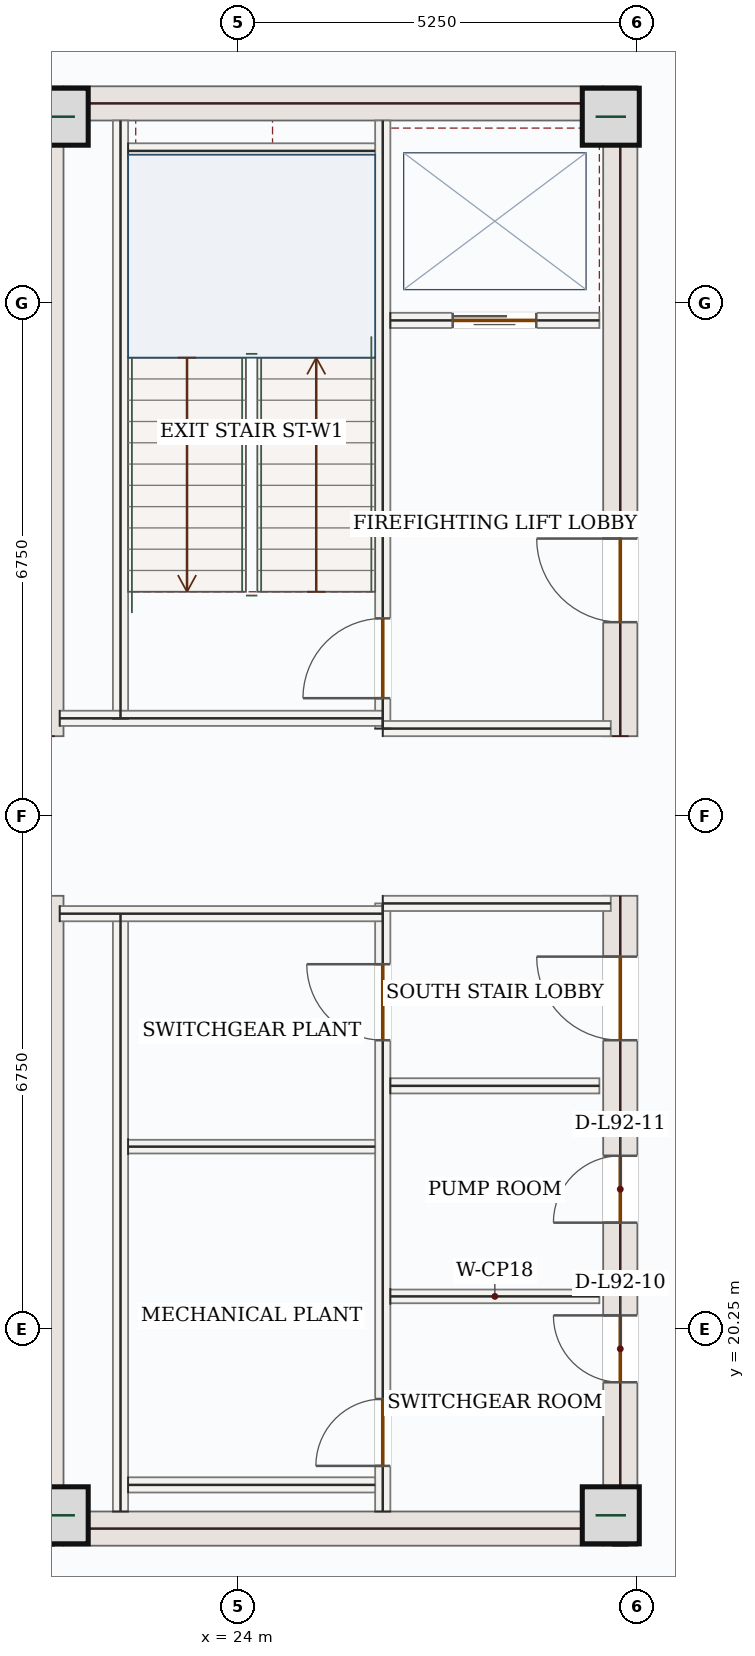
"""IFC4 building model, lengths in metres.
Left out: names, types, materials, properties, quantities, classifications, styles, units other than length and angle.
Written with IfcOpenShell. Run it as: python <this file> out.ifc"""

import sys

from ifc_helpers import new_model, si_unit, direction, frame, frame_2d, origin, origin_2d, place, context, subcontext, project, spatial, rectangle, extrude, source, transform, mapped, element, fill, save


model = new_model("IFC4")
c1 = context("Model", 3, precision=1e-05, world=origin(), true_north=direction((0.0, 1.0)))
c2 = subcontext(c1, "Body", "Model", "MODEL_VIEW")
j1 = project(units=[si_unit("LENGTHUNIT", "METRE"), si_unit("PLANEANGLEUNIT", "RADIAN")], contexts=[c1])
p1 = place(None, origin())
s1 = spatial("IfcSite", under=j1, at=p1, CompositionType="ELEMENT")
p2 = place(p1, origin())
s2 = spatial("IfcBuilding", under=s1, at=p2, CompositionType="ELEMENT")
p3 = place(p2, frame((0.0, 0.0, 379.65)))
s3 = spatial("IfcBuildingStorey", under=s2, at=p3, CompositionType="ELEMENT", Elevation=379.65)
m1 = source(origin(), c2, "Body", "SweptSolid", [
    extrude(rectangle(XDim=8.55, YDim=0.45, at=frame_2d((4.275, 0.0))), origin(), (0.0, 0.0, 1.0), 3.95),
])
for number, where, z_axis, x_axis in (
    (1, (21.475, 17.4, 0.0), (0.0, 0.0, 1.0), (0.0, 1.0, 0.0)),
    (2, (21.475, 28.05, 0.0), (0.0, 0.0, 1.0), (0.0, 1.0, 0.0)),
):
    element("IfcWall", number, at=place(p3, frame(where, z_axis=z_axis, x_axis=x_axis)), inside=s3, PredefinedType="SHEAR", context=c2, shape_type="MappedRepresentation", body=[
        mapped(m1, transform((0.0, 0.0, 0.0), x_axis=(1.0, 0.0, 0.0), y_axis=(0.0, 1.0, 0.0), z_axis=(0.0, 0.0, 1.0), scale=1.0)),
    ])
p4 = place(p3, frame((29.025, 17.4, 0.0), z_axis=(0.0, 0.0, 1.0), x_axis=(0.0, 1.0, 0.0)))
e3 = element("IfcWall", 3, at=p4, inside=s3, PredefinedType="SHEAR", context=c2, shape_type="SweptSolid", body=[
    extrude(rectangle(XDim=8.55, YDim=0.45, at=frame_2d((4.275, 0.0))), origin(), (0.0, 0.0, 1.0), 3.95),
])
p5 = place(p4, frame((6.65, 0.0, 0.0)))
e4 = element("IfcOpeningElement", 4, at=p5, cuts=e3, PredefinedType="OPENING", context=c2, shape_type="SweptSolid", body=[
    extrude(rectangle(XDim=1.1, YDim=2.2, at=frame_2d((0.55, 1.1))), frame((0.0, 0.235, 0.0), z_axis=(0.0, -1.0, 0.0), x_axis=(1.0, 0.0, 0.0)), (0.0, 0.0, 1.0), 0.47),
])
p6 = place(p4, frame((2.15, 0.0, 0.0)))
e5 = element("IfcOpeningElement", 5, at=p6, cuts=e3, PredefinedType="OPENING", context=c2, shape_type="SweptSolid", body=[
    extrude(rectangle(XDim=0.88, YDim=2.1, at=frame_2d((0.44, 1.05))), frame((0.0, 0.235, 0.0), z_axis=(0.0, -1.0, 0.0), x_axis=(1.0, 0.0, 0.0)), (0.0, 0.0, 1.0), 0.47),
])
p7 = place(p4, frame((4.25, 0.0, 0.0)))
e6 = element("IfcOpeningElement", 6, at=p7, cuts=e3, PredefinedType="OPENING", context=c2, shape_type="SweptSolid", body=[
    extrude(rectangle(XDim=0.88, YDim=2.1, at=frame_2d((0.44, 1.05))), frame((0.0, 0.235, 0.0), z_axis=(0.0, -1.0, 0.0), x_axis=(1.0, 0.0, 0.0)), (0.0, 0.0, 1.0), 0.47),
])
p8 = place(p3, frame((29.025, 28.05, 0.0), z_axis=(0.0, 0.0, 1.0), x_axis=(0.0, 1.0, 0.0)))
e7 = element("IfcWall", 7, at=p8, inside=s3, PredefinedType="SHEAR", context=c2, shape_type="SweptSolid", body=[
    extrude(rectangle(XDim=8.55, YDim=0.45, at=frame_2d((4.275, 0.0))), origin(), (0.0, 0.0, 1.0), 3.95),
])
p9 = place(p8, frame((1.5, 0.0, 0.0)))
e8 = element("IfcOpeningElement", 8, at=p9, cuts=e7, PredefinedType="OPENING", context=c2, shape_type="SweptSolid", body=[
    extrude(rectangle(XDim=1.1, YDim=2.2, at=frame_2d((0.55, 1.1))), frame((0.0, 0.235, 0.0), z_axis=(0.0, -1.0, 0.0), x_axis=(1.0, 0.0, 0.0)), (0.0, 0.0, 1.0), 0.47),
])
m2 = source(origin(), c2, "Body", "SweptSolid", [
    extrude(rectangle(XDim=7.1, YDim=0.45, at=frame_2d((3.55, 0.0))), origin(), (0.0, 0.0, 1.0), 3.95),
])
for number, where, z_axis, x_axis in (
    (9, (21.7, 17.625, 0.0), (0.0, 0.0, 1.0), (1.0, 0.0, 0.0)),
    (10, (21.7, 36.375, 0.0), (0.0, 0.0, 1.0), (1.0, 0.0, 0.0)),
):
    element("IfcWall", number, at=place(p3, frame(where, z_axis=z_axis, x_axis=x_axis)), inside=s3, PredefinedType="SHEAR", context=c2, shape_type="MappedRepresentation", body=[
        mapped(m2, transform((0.0, 0.0, 0.0), x_axis=(1.0, 0.0, 0.0), y_axis=(0.0, 1.0, 0.0), z_axis=(0.0, 0.0, 1.0), scale=1.0)),
    ])
m3 = source(origin(), c2, "Body", "SweptSolid", [
    extrude(rectangle(XDim=0.75, YDim=0.75, at=origin_2d()), origin(), (0.0, 0.0, 1.0), 4.2),
])
for number, where, z_axis, x_axis in (
    (11, (21.65, 17.8, 0.0), (0.0, 0.0, 1.0), (1.0, 0.0, 0.0)),
    (12, (28.9, 17.8, 0.0), (0.0, 0.0, 1.0), (1.0, 0.0, 0.0)),
    (13, (21.65, 36.2, 0.0), (0.0, 0.0, 1.0), (1.0, 0.0, 0.0)),
    (14, (28.9, 36.2, 0.0), (0.0, 0.0, 1.0), (1.0, 0.0, 0.0)),
):
    element("IfcColumn", number, at=place(p3, frame(where, z_axis=z_axis, x_axis=x_axis)), inside=s3, PredefinedType="COLUMN", context=c2, shape_type="MappedRepresentation", body=[
        mapped(m3, transform((0.0, 0.0, 0.0), x_axis=(1.0, 0.0, 0.0), y_axis=(0.0, 1.0, 0.0), z_axis=(0.0, 0.0, 1.0), scale=1.0)),
    ])
m4 = source(origin(), c2, "Body", "SweptSolid", [
    extrude(rectangle(XDim=5.258, YDim=0.26, at=frame_2d((2.629, 0.0))), origin(), (0.0, 0.0, 1.0), 3.95),
])
for number, where, z_axis, x_axis in (
    (15, (22.658, 14.74, 0.0), (0.0, 0.0, 1.0), (-0.707, 0.707, 0.0)),
    (16, (18.94, 35.542, 0.0), (0.0, 0.0, 1.0), (0.707, 0.707, 0.0)),
):
    element("IfcWall", number, at=place(p3, frame(where, z_axis=z_axis, x_axis=x_axis)), inside=s3, PredefinedType="SOLIDWALL", context=c2, shape_type="MappedRepresentation", body=[
        mapped(m4, transform((0.0, 0.0, 0.0), x_axis=(1.0, 0.0, 0.0), y_axis=(0.0, 1.0, 0.0), z_axis=(0.0, 0.0, 1.0), scale=1.0)),
    ])
m5 = source(origin(), c2, "Body", "SweptSolid", [
    extrude(rectangle(XDim=7.87, YDim=0.2, at=frame_2d((3.935, 0.0))), origin(), (0.0, 0.0, 1.0), 3.95),
])
for number, where, z_axis, x_axis in (
    (17, (22.45, 17.85, 0.0), (0.0, 0.0, 1.0), (0.0, 1.0, 0.0)),
    (18, (22.45, 28.28, 0.0), (0.0, 0.0, 1.0), (0.0, 1.0, 0.0)),
):
    element("IfcWall", number, at=place(p3, frame(where, z_axis=z_axis, x_axis=x_axis)), inside=s3, PredefinedType="SOLIDWALL", context=c2, shape_type="MappedRepresentation", body=[
        mapped(m5, transform((0.0, 0.0, 0.0), x_axis=(1.0, 0.0, 0.0), y_axis=(0.0, 1.0, 0.0), z_axis=(0.0, 0.0, 1.0), scale=1.0)),
    ])
p10 = place(p3, frame((25.9, 17.85, 0.0), z_axis=(0.0, 0.0, 1.0), x_axis=(0.0, 1.0, 0.0)))
e19 = element("IfcWall", 19, at=p10, inside=s3, PredefinedType="SOLIDWALL", context=c2, shape_type="SweptSolid", body=[
    extrude(rectangle(XDim=8.0, YDim=0.2, at=frame_2d((4.0, 0.0))), origin(), (0.0, 0.0, 1.0), 3.95),
])
p11 = place(p10, frame((6.2, 0.0, 0.0)))
e20 = element("IfcOpeningElement", 20, at=p11, cuts=e19, PredefinedType="OPENING", context=c2, shape_type="SweptSolid", body=[
    extrude(rectangle(XDim=1.0, YDim=2.15, at=frame_2d((0.5, 1.075))), frame((0.0, 0.11, 0.0), z_axis=(0.0, -1.0, 0.0), x_axis=(1.0, 0.0, 0.0)), (0.0, 0.0, 1.0), 0.22),
])
p12 = place(p10, frame((0.6, 0.0, 0.0)))
e21 = element("IfcOpeningElement", 21, at=p12, cuts=e19, PredefinedType="OPENING", context=c2, shape_type="SweptSolid", body=[
    extrude(rectangle(XDim=0.88, YDim=2.1, at=frame_2d((0.44, 1.05))), frame((0.0, 0.11, 0.0), z_axis=(0.0, -1.0, 0.0), x_axis=(1.0, 0.0, 0.0)), (0.0, 0.0, 1.0), 0.22),
])
p13 = place(p3, frame((25.9, 28.15, 0.0), z_axis=(0.0, 0.0, 1.0), x_axis=(0.0, 1.0, 0.0)))
e22 = element("IfcWall", 22, at=p13, inside=s3, PredefinedType="SOLIDWALL", context=c2, shape_type="SweptSolid", body=[
    extrude(rectangle(XDim=8.0, YDim=0.2, at=frame_2d((4.0, 0.0))), origin(), (0.0, 0.0, 1.0), 3.95),
])
p14 = place(p13, frame((0.4, 0.0, 0.0)))
e23 = element("IfcOpeningElement", 23, at=p14, cuts=e22, PredefinedType="OPENING", context=c2, shape_type="SweptSolid", body=[
    extrude(rectangle(XDim=1.05, YDim=2.15, at=frame_2d((0.525, 1.075))), frame((0.0, 0.11, 0.0), z_axis=(0.0, -1.0, 0.0), x_axis=(1.0, 0.0, 0.0)), (0.0, 0.0, 1.0), 0.22),
])
m6 = source(origin(), c2, "Body", "SweptSolid", [
    extrude(rectangle(XDim=4.25, YDim=0.2, at=frame_2d((2.125, 0.0))), origin(), (0.0, 0.0, 1.0), 3.95),
])
p15 = place(p3, frame((21.65, 25.715, 0.0), z_axis=(0.0, 0.0, 1.0), x_axis=(1.0, 0.0, 0.0)))
e24 = element("IfcWall", 24, at=p15, inside=s3, PredefinedType="SOLIDWALL", context=c2, shape_type="MappedRepresentation", body=[
    mapped(m6, transform((0.0, 0.0, 0.0), x_axis=(1.0, 0.0, 0.0), y_axis=(0.0, 1.0, 0.0), z_axis=(0.0, 0.0, 1.0), scale=1.0)),
])
m7 = source(origin(), c2, "Body", "SweptSolid", [
    extrude(rectangle(XDim=3.0, YDim=0.2, at=frame_2d((1.5, 0.0))), origin(), (0.0, 0.0, 1.0), 3.95),
])
p16 = place(p3, frame((25.9, 25.85, 0.0), z_axis=(0.0, 0.0, 1.0), x_axis=(1.0, 0.0, 0.0)))
e25 = element("IfcWall", 25, at=p16, inside=s3, PredefinedType="SOLIDWALL", context=c2, shape_type="MappedRepresentation", body=[
    mapped(m7, transform((0.0, 0.0, 0.0), x_axis=(1.0, 0.0, 0.0), y_axis=(0.0, 1.0, 0.0), z_axis=(0.0, 0.0, 1.0), scale=1.0)),
])
p17 = place(p3, frame((21.65, 28.285, 0.0), z_axis=(0.0, 0.0, 1.0), x_axis=(1.0, 0.0, 0.0)))
e26 = element("IfcWall", 26, at=p17, inside=s3, PredefinedType="SOLIDWALL", context=c2, shape_type="MappedRepresentation", body=[
    mapped(m6, transform((0.0, 0.0, 0.0), x_axis=(1.0, 0.0, 0.0), y_axis=(0.0, 1.0, 0.0), z_axis=(0.0, 0.0, 1.0), scale=1.0)),
])
p18 = place(p3, frame((25.9, 28.15, 0.0), z_axis=(0.0, 0.0, 1.0), x_axis=(1.0, 0.0, 0.0)))
e27 = element("IfcWall", 27, at=p18, inside=s3, PredefinedType="SOLIDWALL", context=c2, shape_type="MappedRepresentation", body=[
    mapped(m7, transform((0.0, 0.0, 0.0), x_axis=(1.0, 0.0, 0.0), y_axis=(0.0, 1.0, 0.0), z_axis=(0.0, 0.0, 1.0), scale=1.0)),
])
m8 = source(origin(), c2, "Body", "SweptSolid", [
    extrude(rectangle(XDim=3.25, YDim=0.2, at=frame_2d((1.625, 0.0))), origin(), (0.0, 0.0, 1.0), 3.95),
])
for number, where, z_axis, x_axis in (
    (28, (22.55, 35.75, 0.0), (0.0, 0.0, 1.0), (1.0, 0.0, 0.0)),
    (29, (22.55, 18.2, 0.0), (0.0, 0.0, 1.0), (1.0, 0.0, 0.0)),
):
    element("IfcWall", number, at=place(p3, frame(where, z_axis=z_axis, x_axis=x_axis)), inside=s3, PredefinedType="SOLIDWALL", context=c2, shape_type="MappedRepresentation", body=[
        mapped(m8, transform((0.0, 0.0, 0.0), x_axis=(1.0, 0.0, 0.0), y_axis=(0.0, 1.0, 0.0), z_axis=(0.0, 0.0, 1.0), scale=1.0)),
    ])
m9 = source(origin(), c2, "Body", "SweptSolid", [
    extrude(rectangle(XDim=3.25, YDim=0.18, at=frame_2d((1.625, 0.0))), origin(), (0.0, 0.0, 1.0), 3.95),
])
p19 = place(p3, frame((22.55, 22.65, 0.0), z_axis=(0.0, 0.0, 1.0), x_axis=(1.0, 0.0, 0.0)))
e30 = element("IfcWall", 30, at=p19, inside=s3, PredefinedType="PARTITIONING", context=c2, shape_type="MappedRepresentation", body=[
    mapped(m9, transform((0.0, 0.0, 0.0), x_axis=(1.0, 0.0, 0.0), y_axis=(0.0, 1.0, 0.0), z_axis=(0.0, 0.0, 1.0), scale=1.0)),
])
p20 = place(p3, frame((26.0, 33.52, 0.0), z_axis=(0.0, 0.0, 1.0), x_axis=(1.0, 0.0, 0.0)))
e31 = element("IfcWall", 31, at=p20, inside=s3, PredefinedType="SOLIDWALL", context=c2, shape_type="SweptSolid", body=[
    extrude(rectangle(XDim=2.75, YDim=0.2, at=frame_2d((1.375, 0.0))), origin(), (0.0, 0.0, 1.0), 3.95),
])
p21 = place(p20, frame((0.82, 0.0, 0.0)))
e32 = element("IfcOpeningElement", 32, at=p21, cuts=e31, PredefinedType="OPENING", context=c2, shape_type="SweptSolid", body=[
    extrude(rectangle(XDim=1.1, YDim=2.15, at=frame_2d((0.55, 1.075))), frame((0.0, 0.11, 0.0), z_axis=(0.0, -1.0, 0.0), x_axis=(1.0, 0.0, 0.0)), (0.0, 0.0, 1.0), 0.22),
])
m10 = source(origin(), c2, "Body", "SweptSolid", [
    extrude(rectangle(XDim=2.75, YDim=0.2, at=frame_2d((1.375, 0.0))), origin(), (0.0, 0.0, 1.0), 3.95),
])
p22 = place(p3, frame((26.0, 23.45, 0.0), z_axis=(0.0, 0.0, 1.0), x_axis=(1.0, 0.0, 0.0)))
e33 = element("IfcWall", 33, at=p22, inside=s3, PredefinedType="SOLIDWALL", context=c2, shape_type="MappedRepresentation", body=[
    mapped(m10, transform((0.0, 0.0, 0.0), x_axis=(1.0, 0.0, 0.0), y_axis=(0.0, 1.0, 0.0), z_axis=(0.0, 0.0, 1.0), scale=1.0)),
])
m11 = source(origin(), c2, "Body", "SweptSolid", [
    extrude(rectangle(XDim=2.75, YDim=0.18, at=frame_2d((1.375, 0.0))), origin(), (0.0, 0.0, 1.0), 3.95),
])
p23 = place(p3, frame((26.0, 20.68, 0.0), z_axis=(0.0, 0.0, 1.0), x_axis=(1.0, 0.0, 0.0)))
e34 = element("IfcWall", 34, at=p23, inside=s3, PredefinedType="PARTITIONING", context=c2, shape_type="MappedRepresentation", body=[
    mapped(m11, transform((0.0, 0.0, 0.0), x_axis=(1.0, 0.0, 0.0), y_axis=(0.0, 1.0, 0.0), z_axis=(0.0, 0.0, 1.0), scale=1.0)),
])
m12 = source(origin(), c2, "Body", "SweptSolid", [
    extrude(rectangle(XDim=1.05, YDim=2.15, at=frame_2d((0.525, 1.075))), frame((0.0, 0.025, 0.0), z_axis=(0.0, -1.0, 0.0), x_axis=(1.0, 0.0, 0.0)), (0.0, 0.0, 1.0), 0.05),
])
p24 = place(p14, origin())
e35 = element("IfcDoor", 35, at=p24, inside=s3, OperationType="SINGLE_SWING_LEFT", PredefinedType="DOOR", context=c2, shape_type="MappedRepresentation", body=[
    mapped(m12, transform((0.0, 0.0, 0.0), x_axis=(1.0, 0.0, 0.0), y_axis=(0.0, 1.0, 0.0), z_axis=(0.0, 0.0, 1.0), scale=1.0)),
])
fill(e23, e35)
m13 = source(origin(), c2, "Body", "SweptSolid", [
    extrude(rectangle(XDim=1.0, YDim=2.15, at=frame_2d((0.5, 1.075))), frame((0.0, 0.025, 0.0), z_axis=(0.0, -1.0, 0.0), x_axis=(1.0, 0.0, 0.0)), (0.0, 0.0, 1.0), 0.05),
])
p25 = place(p11, origin())
e36 = element("IfcDoor", 36, at=p25, inside=s3, OperationType="SINGLE_SWING_RIGHT", PredefinedType="DOOR", context=c2, shape_type="MappedRepresentation", body=[
    mapped(m13, transform((0.0, 0.0, 0.0), x_axis=(1.0, 0.0, 0.0), y_axis=(0.0, 1.0, 0.0), z_axis=(0.0, 0.0, 1.0), scale=1.0)),
])
fill(e20, e36)
m14 = source(origin(), c2, "Body", "SweptSolid", [
    extrude(rectangle(XDim=0.88, YDim=2.1, at=frame_2d((0.44, 1.05))), frame((0.0, 0.025, 0.0), z_axis=(0.0, -1.0, 0.0), x_axis=(1.0, 0.0, 0.0)), (0.0, 0.0, 1.0), 0.05),
])
p26 = place(p12, origin())
e37 = element("IfcDoor", 37, at=p26, inside=s3, OperationType="SINGLE_SWING_LEFT", PredefinedType="DOOR", context=c2, shape_type="MappedRepresentation", body=[
    mapped(m14, transform((0.0, 0.0, 0.0), x_axis=(1.0, 0.0, 0.0), y_axis=(0.0, 1.0, 0.0), z_axis=(0.0, 0.0, 1.0), scale=1.0)),
])
fill(e21, e37)
m15 = source(origin(), c2, "Body", "SweptSolid", [
    extrude(rectangle(XDim=1.1, YDim=2.15, at=frame_2d((0.55, 1.075))), frame((0.0, 0.025, 0.0), z_axis=(0.0, -1.0, 0.0), x_axis=(1.0, 0.0, 0.0)), (0.0, 0.0, 1.0), 0.05),
])
p27 = place(p21, origin())
e38 = element("IfcDoor", 38, at=p27, inside=s3, OperationType="DOUBLE_DOOR_SLIDING", PredefinedType="DOOR", context=c2, shape_type="MappedRepresentation", body=[
    mapped(m15, transform((0.0, 0.0, 0.0), x_axis=(1.0, 0.0, 0.0), y_axis=(0.0, 1.0, 0.0), z_axis=(0.0, 0.0, 1.0), scale=1.0)),
])
fill(e32, e38)
m16 = source(origin(), c2, "Body", "SweptSolid", [
    extrude(rectangle(XDim=1.1, YDim=2.2, at=frame_2d((0.55, 1.1))), frame((0.0, 0.025, 0.0), z_axis=(0.0, -1.0, 0.0), x_axis=(1.0, 0.0, 0.0)), (0.0, 0.0, 1.0), 0.05),
])
p28 = place(p9, origin())
e39 = element("IfcDoor", 39, at=p28, inside=s3, OperationType="SINGLE_SWING_RIGHT", PredefinedType="DOOR", context=c2, shape_type="MappedRepresentation", body=[
    mapped(m16, transform((0.0, 0.0, 0.0), x_axis=(1.0, 0.0, 0.0), y_axis=(0.0, 1.0, 0.0), z_axis=(0.0, 0.0, 1.0), scale=1.0)),
])
fill(e8, e39)
p29 = place(p5, origin())
e40 = element("IfcDoor", 40, at=p29, inside=s3, OperationType="SINGLE_SWING_RIGHT", PredefinedType="DOOR", context=c2, shape_type="MappedRepresentation", body=[
    mapped(m16, transform((0.0, 0.0, 0.0), x_axis=(1.0, 0.0, 0.0), y_axis=(0.0, 1.0, 0.0), z_axis=(0.0, 0.0, 1.0), scale=1.0)),
])
fill(e4, e40)
p30 = place(p6, origin())
e41 = element("IfcDoor", 41, at=p30, inside=s3, OperationType="SINGLE_SWING_RIGHT", PredefinedType="DOOR", context=c2, shape_type="MappedRepresentation", body=[
    mapped(m14, transform((0.0, 0.0, 0.0), x_axis=(1.0, 0.0, 0.0), y_axis=(0.0, 1.0, 0.0), z_axis=(0.0, 0.0, 1.0), scale=1.0)),
])
fill(e5, e41)
p31 = place(p7, origin())
e42 = element("IfcDoor", 42, at=p31, inside=s3, OperationType="SINGLE_SWING_LEFT", PredefinedType="DOOR", context=c2, shape_type="MappedRepresentation", body=[
    mapped(m14, transform((0.0, 0.0, 0.0), x_axis=(1.0, 0.0, 0.0), y_axis=(0.0, 1.0, 0.0), z_axis=(0.0, 0.0, 1.0), scale=1.0)),
])
fill(e6, e42)
save(model, sys.argv[1])
